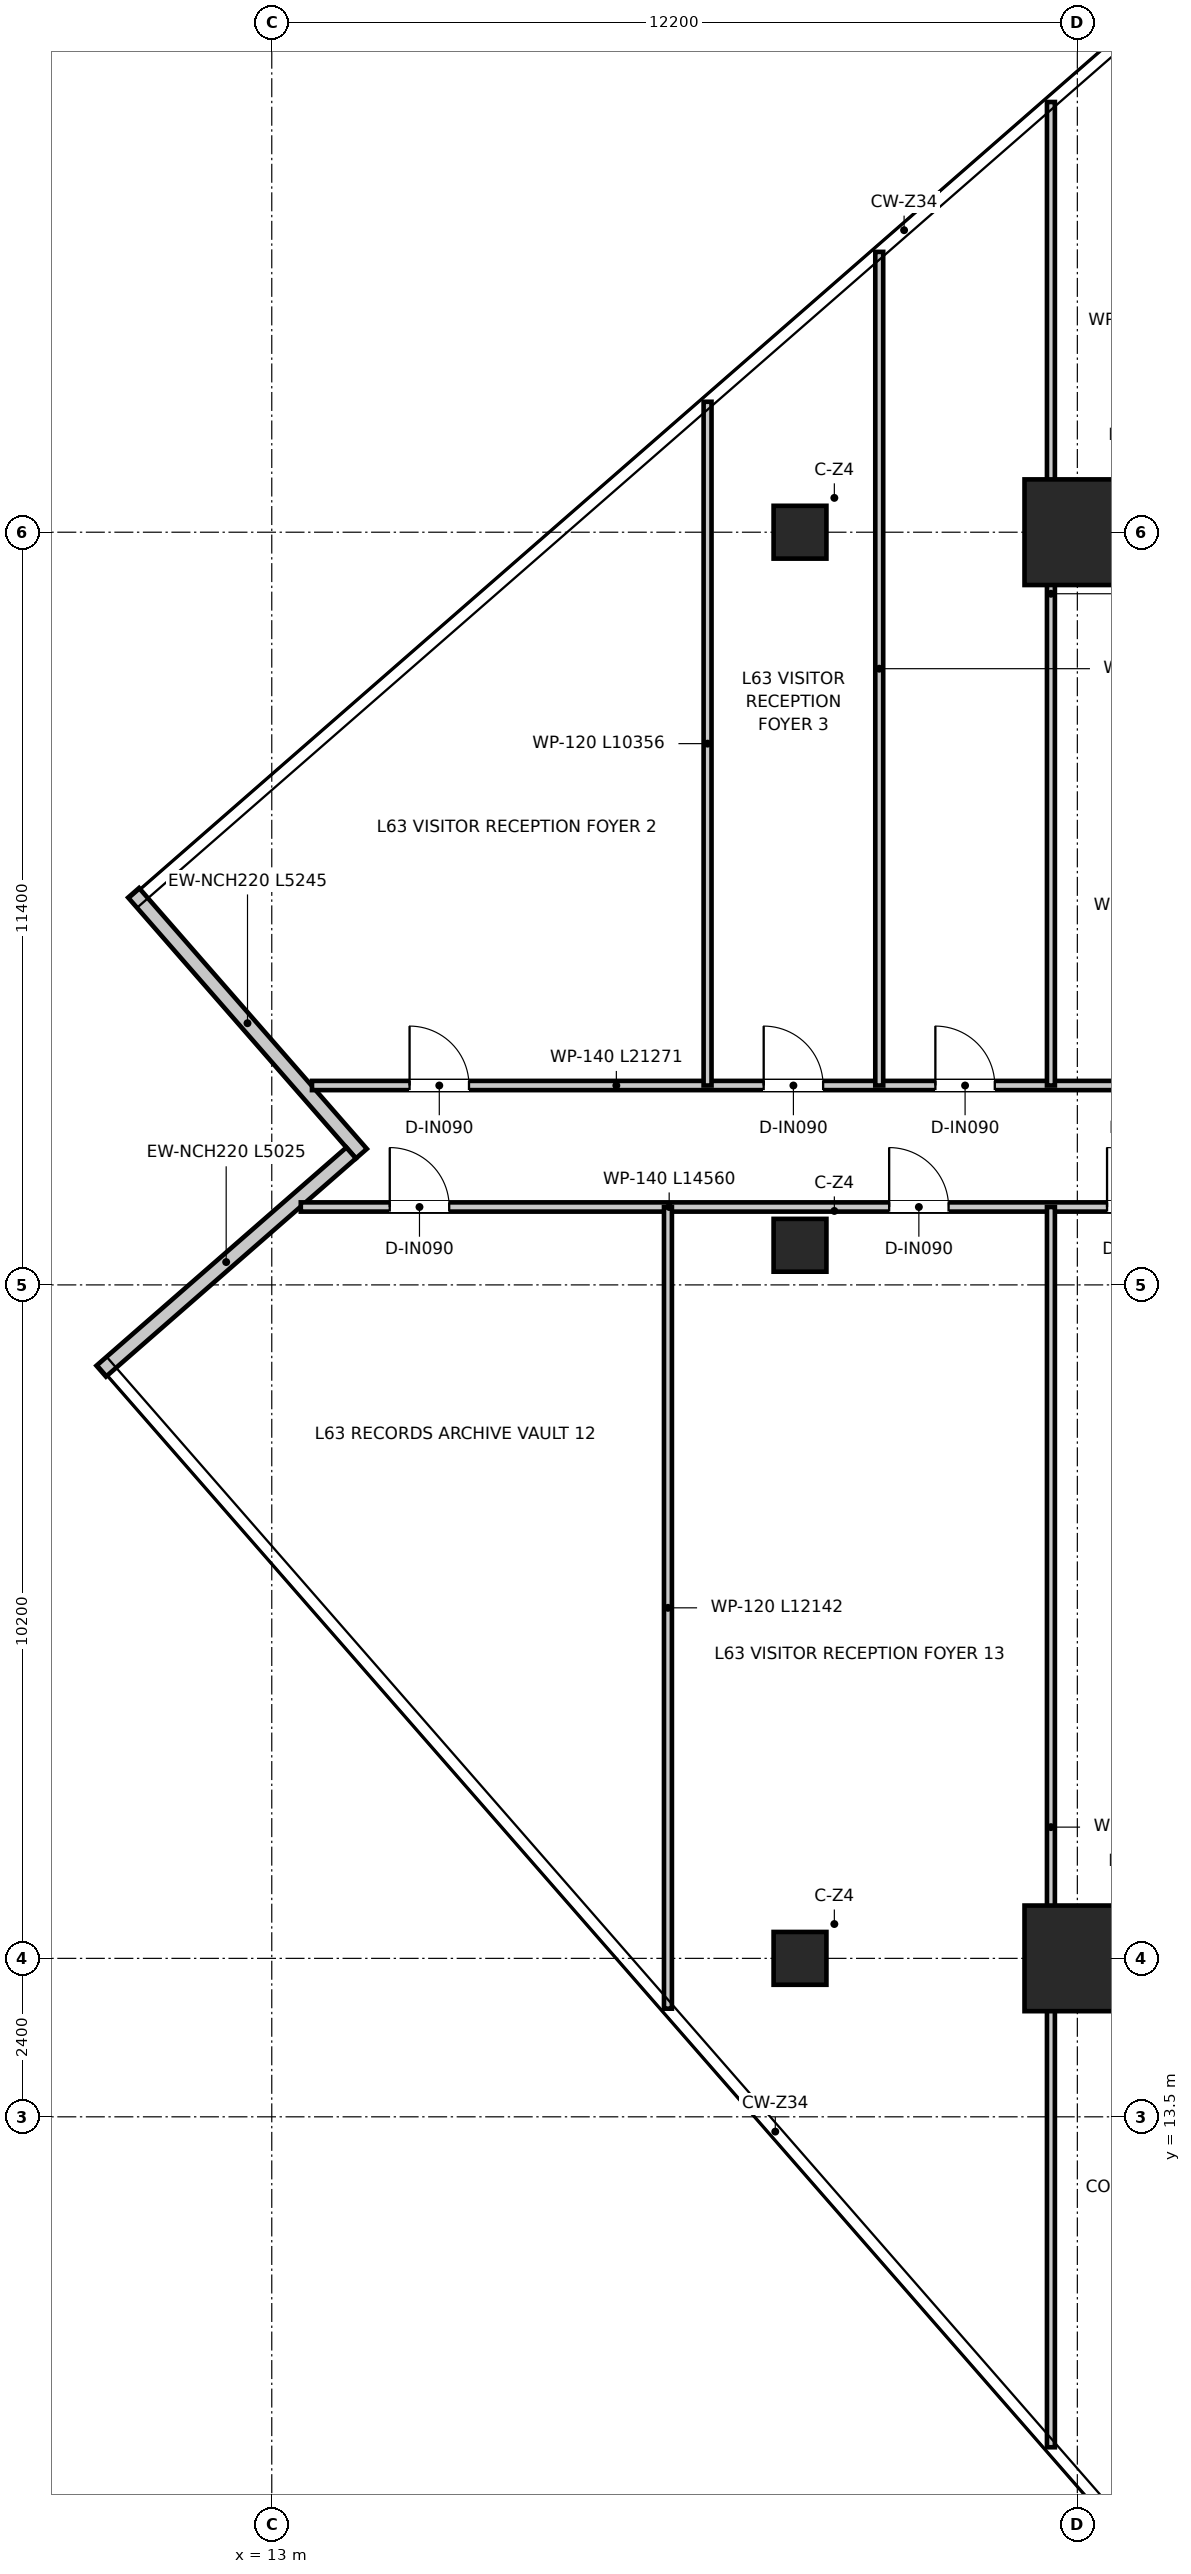
"""IFC4 building model, lengths in metres.
Left out: names, types, materials, properties, quantities, classifications, styles, units other than length and angle.
Written with IfcOpenShell. Run it as: python <this file> out.ifc"""

import sys

from ifc_helpers import new_model, si_unit, direction, frame, frame_2d, origin, origin_2d, place, context, subcontext, project, spatial, rectangle, extrude, source, transform, mapped, element, fill, save


model = new_model("IFC4")
c1 = context("Model", 3, precision=1e-05, world=origin(), true_north=direction((0.0, 1.0)))
c2 = subcontext(c1, "Body", "Model", "MODEL_VIEW")
j1 = project(units=[si_unit("LENGTHUNIT", "METRE"), si_unit("PLANEANGLEUNIT", "RADIAN")], contexts=[c1])
p1 = place(None, origin())
s1 = spatial("IfcSite", under=j1, at=p1, CompositionType="ELEMENT")
p2 = place(p1, origin())
s2 = spatial("IfcBuilding", under=s1, at=p2, CompositionType="ELEMENT")
p3 = place(p2, frame((0.0, 0.0, 258.65)))
s3 = spatial("IfcBuildingStorey", under=s2, at=p3, CompositionType="ELEMENT", Elevation=258.65)
m1 = source(origin(), c2, "Body", "SweptSolid", [
    extrude(rectangle(XDim=1.6, YDim=1.6, at=origin_2d()), origin(), (0.0, 0.0, 1.0), 3.95),
])
for number, where, z_axis, x_axis in (
    (1, (25.2, 15.9, 0.0), (0.0, 0.0, 1.0), (1.0, 0.0, 0.0)),
    (2, (25.2, 37.5, 0.0), (0.0, 0.0, 1.0), (1.0, 0.0, 0.0)),
):
    element("IfcColumn", number, at=place(p3, frame(where, z_axis=z_axis, x_axis=x_axis)), inside=s3, PredefinedType="USERDEFINED", context=c2, shape_type="MappedRepresentation", body=[
        mapped(m1, transform((0.0, 0.0, 0.0), x_axis=(1.0, 0.0, 0.0), y_axis=(0.0, 1.0, 0.0), z_axis=(0.0, 0.0, 1.0), scale=1.0)),
    ])
m2 = source(origin(), c2, "Body", "SweptSolid", [
    extrude(rectangle(XDim=0.8, YDim=0.8, at=origin_2d()), origin(), (0.0, 0.0, 1.0), 3.95),
])
for number, where, z_axis, x_axis in (
    (3, (21.0, 15.9, 0.0), (0.0, 0.0, 1.0), (1.0, 0.0, 0.0)),
    (4, (21.0, 26.7, 0.0), (0.0, 0.0, 1.0), (1.0, 0.0, 0.0)),
    (5, (21.0, 37.5, 0.0), (0.0, 0.0, 1.0), (1.0, 0.0, 0.0)),
):
    element("IfcColumn", number, at=place(p3, frame(where, z_axis=z_axis, x_axis=x_axis)), inside=s3, PredefinedType="COLUMN", context=c2, shape_type="MappedRepresentation", body=[
        mapped(m2, transform((0.0, 0.0, 0.0), x_axis=(1.0, 0.0, 0.0), y_axis=(0.0, 1.0, 0.0), z_axis=(0.0, 0.0, 1.0), scale=1.0)),
    ])
p4 = place(p3, frame((10.908, 32.039, 0.0), z_axis=(0.0, 0.0, 1.0), x_axis=(0.657710057617, -0.7532711863, 0.0)))
e6 = element("IfcWall", 6, at=p4, inside=s3, PredefinedType="ELEMENTEDWALL", context=c2, shape_type="SweptSolid", body=[
    extrude(rectangle(XDim=5.245, YDim=0.22, at=frame_2d((2.623, 0.0))), origin(), (0.0, 0.0, 1.0), 3.6),
])
p5 = place(p3, frame((14.202, 28.098, 0.0), z_axis=(0.0, 0.0, 1.0), x_axis=(-0.753274531518, -0.657706226339, 0.0)))
e7 = element("IfcWall", 7, at=p5, inside=s3, PredefinedType="ELEMENTEDWALL", context=c2, shape_type="SweptSolid", body=[
    extrude(rectangle(XDim=5.025, YDim=0.22, at=frame_2d((2.512, 0.0))), origin(), (0.0, 0.0, 1.0), 3.6),
])
p6 = place(p3, frame((13.609, 29.12, 0.0), z_axis=(0.0, 0.0, 1.0), x_axis=(1.0, 0.0, 0.0)))
e8 = element("IfcWall", 8, at=p6, inside=s3, PredefinedType="PARTITIONING", context=c2, shape_type="SweptSolid", body=[
    extrude(rectangle(XDim=21.271, YDim=0.14, at=frame_2d((10.635, 0.0))), origin(), (0.0, 0.0, 1.0), 2.96),
])
p7 = place(p6, frame((17.341, 0.0, 0.0)))
e9 = element("IfcOpeningElement", 9, at=p7, cuts=e8, PredefinedType="OPENING", context=c2, shape_type="SweptSolid", body=[
    extrude(rectangle(XDim=0.9, YDim=2.1, at=frame_2d((0.45, 1.05))), frame((0.0, 0.08, 0.0), z_axis=(0.0, -1.0, 0.0), x_axis=(1.0, 0.0, 0.0)), (0.0, 0.0, 1.0), 0.16),
])
p8 = place(p6, frame((1.478, 0.0, 0.0)))
e10 = element("IfcOpeningElement", 10, at=p8, cuts=e8, PredefinedType="OPENING", context=c2, shape_type="SweptSolid", body=[
    extrude(rectangle(XDim=0.9, YDim=2.1, at=frame_2d((0.45, 1.05))), frame((0.0, 0.08, 0.0), z_axis=(0.0, -1.0, 0.0), x_axis=(1.0, 0.0, 0.0)), (0.0, 0.0, 1.0), 0.16),
])
p9 = place(p6, frame((6.841, 0.0, 0.0)))
e11 = element("IfcOpeningElement", 11, at=p9, cuts=e8, PredefinedType="OPENING", context=c2, shape_type="SweptSolid", body=[
    extrude(rectangle(XDim=0.9, YDim=2.1, at=frame_2d((0.45, 1.05))), frame((0.0, 0.08, 0.0), z_axis=(0.0, -1.0, 0.0), x_axis=(1.0, 0.0, 0.0)), (0.0, 0.0, 1.0), 0.16),
])
p10 = place(p6, frame((9.441, 0.0, 0.0)))
e12 = element("IfcOpeningElement", 12, at=p10, cuts=e8, PredefinedType="OPENING", context=c2, shape_type="SweptSolid", body=[
    extrude(rectangle(XDim=0.9, YDim=2.1, at=frame_2d((0.45, 1.05))), frame((0.0, 0.08, 0.0), z_axis=(0.0, -1.0, 0.0), x_axis=(1.0, 0.0, 0.0)), (0.0, 0.0, 1.0), 0.16),
])
p11 = place(p6, frame((12.141, 0.0, 0.0)))
e13 = element("IfcOpeningElement", 13, at=p11, cuts=e8, PredefinedType="OPENING", context=c2, shape_type="SweptSolid", body=[
    extrude(rectangle(XDim=0.9, YDim=2.1, at=frame_2d((0.45, 1.05))), frame((0.0, 0.08, 0.0), z_axis=(0.0, -1.0, 0.0), x_axis=(1.0, 0.0, 0.0)), (0.0, 0.0, 1.0), 0.16),
])
p12 = place(p3, frame((13.439, 27.28, 0.0), z_axis=(0.0, 0.0, 1.0), x_axis=(1.0, 0.0, 0.0)))
e14 = element("IfcWall", 14, at=p12, inside=s3, PredefinedType="PARTITIONING", context=c2, shape_type="SweptSolid", body=[
    extrude(rectangle(XDim=14.561, YDim=0.14, at=frame_2d((7.28, 0.0))), origin(), (0.0, 0.0, 1.0), 2.96),
])
p13 = place(p12, frame((1.347, 0.0, 0.0)))
e15 = element("IfcOpeningElement", 15, at=p13, cuts=e14, PredefinedType="OPENING", context=c2, shape_type="SweptSolid", body=[
    extrude(rectangle(XDim=0.9, YDim=2.1, at=frame_2d((0.45, 1.05))), frame((0.0, 0.08, 0.0), z_axis=(0.0, -1.0, 0.0), x_axis=(1.0, 0.0, 0.0)), (0.0, 0.0, 1.0), 0.16),
])
p14 = place(p12, frame((8.91, 0.0, 0.0)))
e16 = element("IfcOpeningElement", 16, at=p14, cuts=e14, PredefinedType="OPENING", context=c2, shape_type="SweptSolid", body=[
    extrude(rectangle(XDim=0.9, YDim=2.1, at=frame_2d((0.45, 1.05))), frame((0.0, 0.08, 0.0), z_axis=(0.0, -1.0, 0.0), x_axis=(1.0, 0.0, 0.0)), (0.0, 0.0, 1.0), 0.16),
])
p15 = place(p12, frame((12.21, 0.0, 0.0)))
e17 = element("IfcOpeningElement", 17, at=p15, cuts=e14, PredefinedType="OPENING", context=c2, shape_type="SweptSolid", body=[
    extrude(rectangle(XDim=0.9, YDim=2.1, at=frame_2d((0.45, 1.05))), frame((0.0, 0.08, 0.0), z_axis=(0.0, -1.0, 0.0), x_axis=(1.0, 0.0, 0.0)), (0.0, 0.0, 1.0), 0.16),
])
p16 = place(p3, frame((19.6, 29.12, 0.0), z_axis=(0.0, 0.0, 1.0), x_axis=(0.0, 1.0, 0.0)))
e18 = element("IfcWall", 18, at=p16, inside=s3, PredefinedType="PARTITIONING", context=c2, shape_type="SweptSolid", body=[
    extrude(rectangle(XDim=10.355, YDim=0.12, at=frame_2d((5.178, 0.0))), origin(), (0.0, 0.0, 1.0), 3.6),
])
p17 = place(p3, frame((22.2, 29.12, 0.0), z_axis=(0.0, 0.0, 1.0), x_axis=(0.0, 1.0, 0.0)))
e19 = element("IfcWall", 19, at=p17, inside=s3, PredefinedType="PARTITIONING", context=c2, shape_type="SweptSolid", body=[
    extrude(rectangle(XDim=12.626, YDim=0.12, at=frame_2d((6.313, 0.0))), origin(), (0.0, 0.0, 1.0), 3.11),
])
p18 = place(p3, frame((24.8, 29.12, 0.0), z_axis=(0.0, 0.0, 1.0), x_axis=(0.0, 1.0, 0.0)))
e20 = element("IfcWall", 20, at=p18, inside=s3, PredefinedType="PARTITIONING", context=c2, shape_type="SweptSolid", body=[
    extrude(rectangle(XDim=14.896, YDim=0.12, at=frame_2d((7.448, 0.0))), origin(), (0.0, 0.0, 1.0), 3.11),
])
p19 = place(p3, frame((19.0, 15.138, 0.0), z_axis=(0.0, 0.0, 1.0), x_axis=(0.0, 1.0, 0.0)))
e21 = element("IfcWall", 21, at=p19, inside=s3, PredefinedType="PARTITIONING", context=c2, shape_type="SweptSolid", body=[
    extrude(rectangle(XDim=12.142, YDim=0.12, at=frame_2d((6.071, 0.0))), origin(), (0.0, 0.0, 1.0), 3.6),
])
p20 = place(p3, frame((24.8, 8.495, 0.0), z_axis=(0.0, 0.0, 1.0), x_axis=(0.0, 1.0, 0.0)))
e22 = element("IfcWall", 22, at=p20, inside=s3, PredefinedType="PARTITIONING", context=c2, shape_type="SweptSolid", body=[
    extrude(rectangle(XDim=18.785, YDim=0.12, at=frame_2d((9.392, 0.0))), origin(), (0.0, 0.0, 1.0), 3.11),
])
p21 = place(p8, origin())
e23 = element("IfcDoor", 23, at=p21, inside=s3, OperationType="SINGLE_SWING_LEFT", PredefinedType="DOOR", context=c2, shape_type="SweptSolid", body=[
    extrude(rectangle(XDim=0.9, YDim=2.1, at=frame_2d((0.45, 1.05))), frame((0.0, 0.025, 0.0), z_axis=(0.0, -1.0, 0.0), x_axis=(1.0, 0.0, 0.0)), (0.0, 0.0, 1.0), 0.05),
])
fill(e10, e23)
p22 = place(p9, origin())
e24 = element("IfcDoor", 24, at=p22, inside=s3, OperationType="SINGLE_SWING_LEFT", PredefinedType="DOOR", context=c2, shape_type="SweptSolid", body=[
    extrude(rectangle(XDim=0.9, YDim=2.1, at=frame_2d((0.45, 1.05))), frame((0.0, 0.025, 0.0), z_axis=(0.0, -1.0, 0.0), x_axis=(1.0, 0.0, 0.0)), (0.0, 0.0, 1.0), 0.05),
])
fill(e11, e24)
p23 = place(p10, origin())
e25 = element("IfcDoor", 25, at=p23, inside=s3, OperationType="SINGLE_SWING_LEFT", PredefinedType="DOOR", context=c2, shape_type="SweptSolid", body=[
    extrude(rectangle(XDim=0.9, YDim=2.1, at=frame_2d((0.45, 1.05))), frame((0.0, 0.025, 0.0), z_axis=(0.0, -1.0, 0.0), x_axis=(1.0, 0.0, 0.0)), (0.0, 0.0, 1.0), 0.05),
])
fill(e12, e25)
p24 = place(p13, origin())
e26 = element("IfcDoor", 26, at=p24, inside=s3, OperationType="SINGLE_SWING_LEFT", PredefinedType="DOOR", context=c2, shape_type="SweptSolid", body=[
    extrude(rectangle(XDim=0.9, YDim=2.1, at=frame_2d((0.45, 1.05))), frame((0.0, 0.025, 0.0), z_axis=(0.0, -1.0, 0.0), x_axis=(1.0, 0.0, 0.0)), (0.0, 0.0, 1.0), 0.05),
])
fill(e15, e26)
p25 = place(p14, origin())
e27 = element("IfcDoor", 27, at=p25, inside=s3, OperationType="SINGLE_SWING_LEFT", PredefinedType="DOOR", context=c2, shape_type="SweptSolid", body=[
    extrude(rectangle(XDim=0.9, YDim=2.1, at=frame_2d((0.45, 1.05))), frame((0.0, 0.025, 0.0), z_axis=(0.0, -1.0, 0.0), x_axis=(1.0, 0.0, 0.0)), (0.0, 0.0, 1.0), 0.05),
])
fill(e16, e27)
p26 = place(p15, origin())
e28 = element("IfcDoor", 28, at=p26, inside=s3, OperationType="SINGLE_SWING_LEFT", PredefinedType="DOOR", context=c2, shape_type="SweptSolid", body=[
    extrude(rectangle(XDim=0.9, YDim=2.1, at=frame_2d((0.45, 1.05))), frame((0.0, 0.025, 0.0), z_axis=(0.0, -1.0, 0.0), x_axis=(1.0, 0.0, 0.0)), (0.0, 0.0, 1.0), 0.05),
])
fill(e17, e28)
save(model, sys.argv[1])
